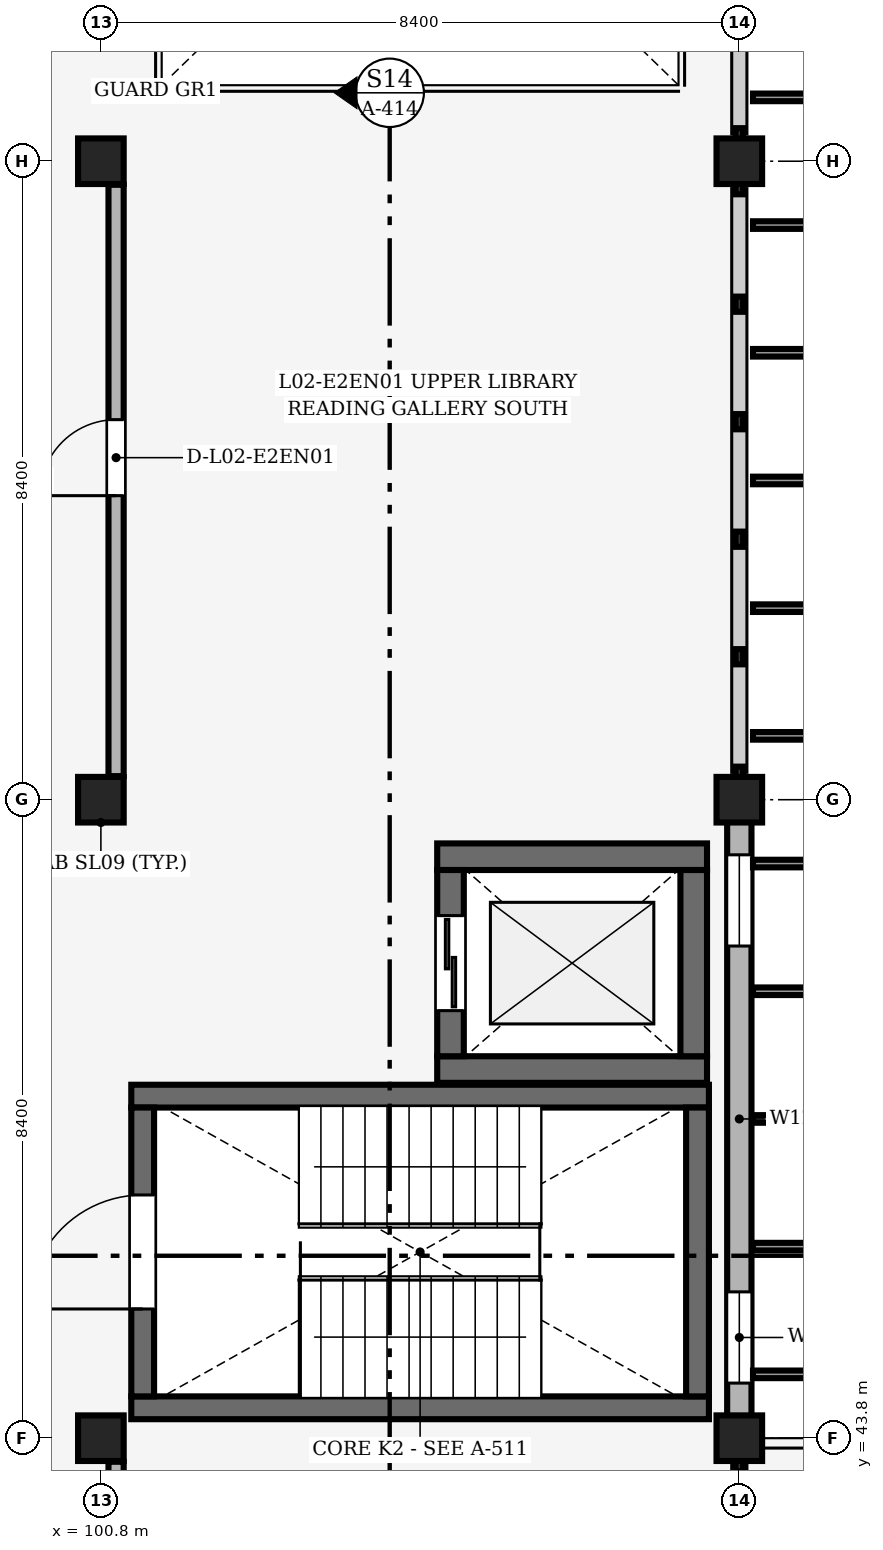
"""IFC4 building model, lengths in metres.
Left out: names, types, materials, properties, quantities, classifications, styles, units other than length and angle.
Written with IfcOpenShell. Run it as: python <this file> out.ifc"""

import sys

from ifc_helpers import new_model, si_unit, direction, frame, frame_2d, origin, origin_2d, place, context, subcontext, project, spatial, rectangle, extrude, element, fill, save


model = new_model("IFC4")
c1 = context("Model", 3, precision=1e-05, world=origin(), true_north=direction((0.0, 1.0)))
c2 = subcontext(c1, "Body", "Model", "MODEL_VIEW")
j1 = project(units=[si_unit("LENGTHUNIT", "METRE"), si_unit("PLANEANGLEUNIT", "RADIAN")], contexts=[c1])
p1 = place(None, origin())
s1 = spatial("IfcSite", under=j1, at=p1, CompositionType="ELEMENT")
p2 = place(p1, origin())
s2 = spatial("IfcBuilding", under=s1, at=p2, CompositionType="ELEMENT")
p3 = place(p2, frame((0.0, 0.0, 9.0)))
s3 = spatial("IfcBuildingStorey", under=s2, at=p3, CompositionType="ELEMENT", Elevation=9.0)
for number, where, z_axis, x_axis in (
    (1, (100.8, 43.8, 0.0), (0.0, 0.0, 1.0), (1.0, 0.0, 0.0)),
    (2, (100.8, 52.2, 0.0), (0.0, 0.0, 1.0), (1.0, 0.0, 0.0)),
    (3, (100.8, 60.6, 0.0), (0.0, 0.0, 1.0), (1.0, 0.0, 0.0)),
    (4, (109.2, 43.8, 0.0), (0.0, 0.0, 1.0), (1.0, 0.0, 0.0)),
    (5, (109.2, 52.2, 0.0), (0.0, 0.0, 1.0), (1.0, 0.0, 0.0)),
    (6, (109.2, 60.6, 0.0), (0.0, 0.0, 1.0), (1.0, 0.0, 0.0)),
):
    element("IfcColumn", number, at=place(p3, frame(where, z_axis=z_axis, x_axis=x_axis)), inside=s3, PredefinedType="COLUMN", context=c2, shape_type="SweptSolid", body=[
        extrude(rectangle(XDim=0.6, YDim=0.6, at=origin_2d()), origin(), (0.0, 0.0, 1.0), 4.2),
    ])
p4 = place(p3, frame((109.2, 44.075, 0.0), z_axis=(0.0, 0.0, 1.0), x_axis=(0.0, 1.0, 0.0)))
e7 = element("IfcWall", 7, at=p4, inside=s3, PredefinedType="SOLIDWALL", context=c2, shape_type="SweptSolid", body=[
    extrude(rectangle(XDim=7.85, YDim=0.32, at=frame_2d((3.925, 0.0))), origin(), (0.0, 0.0, 1.0), 3.34),
])
p5 = place(p4, frame((0.45, 0.0, 0.85)))
e8 = element("IfcOpeningElement", 8, at=p5, cuts=e7, PredefinedType="OPENING", context=c2, shape_type="SweptSolid", body=[
    extrude(rectangle(XDim=1.2, YDim=1.8, at=frame_2d((0.6, 0.9))), frame((0.0, 0.17, 0.0), z_axis=(0.0, -1.0, 0.0), x_axis=(1.0, 0.0, 0.0)), (0.0, 0.0, 1.0), 0.34),
])
p6 = place(p4, frame((6.2, 0.0, 0.85)))
e9 = element("IfcOpeningElement", 9, at=p6, cuts=e7, PredefinedType="OPENING", context=c2, shape_type="SweptSolid", body=[
    extrude(rectangle(XDim=1.2, YDim=1.8, at=frame_2d((0.6, 0.9))), frame((0.0, 0.17, 0.0), z_axis=(0.0, -1.0, 0.0), x_axis=(1.0, 0.0, 0.0)), (0.0, 0.0, 1.0), 0.34),
])
for number, where, z_axis, x_axis in (
    (10, (101.2, 44.2, 0.0), (0.0, 0.0, 1.0), (1.0, 0.0, 0.0)),
    (11, (101.2, 48.3, 0.0), (0.0, 0.0, 1.0), (1.0, 0.0, 0.0)),
):
    element("IfcWall", number, at=place(p3, frame(where, z_axis=z_axis, x_axis=x_axis)), inside=s3, PredefinedType="SHEAR", context=c2, shape_type="SweptSolid", body=[
        extrude(rectangle(XDim=7.6, YDim=0.3, at=frame_2d((3.8, 0.0))), origin(), (0.0, 0.0, 1.0), 4.025),
    ])
p7 = place(p3, frame((101.35, 44.35, 0.0), z_axis=(0.0, 0.0, 1.0), x_axis=(0.0, 1.0, 0.0)))
e12 = element("IfcWall", 12, at=p7, inside=s3, PredefinedType="SHEAR", context=c2, shape_type="SweptSolid", body=[
    extrude(rectangle(XDim=3.8, YDim=0.3, at=frame_2d((1.9, 0.0))), origin(), (0.0, 0.0, 1.0), 4.025),
])
p8 = place(p7, frame((1.15, 0.0, 0.0)))
e13 = element("IfcOpeningElement", 13, at=p8, cuts=e12, PredefinedType="OPENING", context=c2, shape_type="SweptSolid", body=[
    extrude(rectangle(XDim=1.5, YDim=2.2, at=frame_2d((0.75, 1.1))), frame((0.0, 0.16, 0.0), z_axis=(0.0, -1.0, 0.0), x_axis=(1.0, 0.0, 0.0)), (0.0, 0.0, 1.0), 0.32),
])
p9 = place(p3, frame((108.65, 44.35, 0.0), z_axis=(0.0, 0.0, 1.0), x_axis=(0.0, 1.0, 0.0)))
e14 = element("IfcWall", 14, at=p9, inside=s3, PredefinedType="SHEAR", context=c2, shape_type="SweptSolid", body=[
    extrude(rectangle(XDim=3.8, YDim=0.3, at=frame_2d((1.9, 0.0))), origin(), (0.0, 0.0, 1.0), 4.025),
])
for number, where, z_axis, x_axis in (
    (15, (105.225, 48.65, 0.0), (0.0, 0.0, 1.0), (1.0, 0.0, 0.0)),
    (16, (105.225, 51.45, 0.0), (0.0, 0.0, 1.0), (1.0, 0.0, 0.0)),
):
    element("IfcWall", number, at=place(p3, frame(where, z_axis=z_axis, x_axis=x_axis)), inside=s3, PredefinedType="SHEAR", context=c2, shape_type="SweptSolid", body=[
        extrude(rectangle(XDim=3.55, YDim=0.35, at=frame_2d((1.775, 0.0))), origin(), (0.0, 0.0, 1.0), 3.92),
    ])
p10 = place(p3, frame((105.4, 48.825, 0.0), z_axis=(0.0, 0.0, 1.0), x_axis=(0.0, 1.0, 0.0)))
e17 = element("IfcWall", 17, at=p10, inside=s3, PredefinedType="SHEAR", context=c2, shape_type="SweptSolid", body=[
    extrude(rectangle(XDim=2.45, YDim=0.35, at=frame_2d((1.225, 0.0))), origin(), (0.0, 0.0, 1.0), 3.92),
])
p11 = place(p10, frame((0.6, 0.0, 0.0)))
e18 = element("IfcOpeningElement", 18, at=p11, cuts=e17, PredefinedType="OPENING", context=c2, shape_type="SweptSolid", body=[
    extrude(rectangle(XDim=1.25, YDim=2.25, at=frame_2d((0.625, 1.125))), frame((0.0, 0.185, 0.0), z_axis=(0.0, -1.0, 0.0), x_axis=(1.0, 0.0, 0.0)), (0.0, 0.0, 1.0), 0.37),
])
p12 = place(p3, frame((108.6, 48.825, 0.0), z_axis=(0.0, 0.0, 1.0), x_axis=(0.0, 1.0, 0.0)))
e19 = element("IfcWall", 19, at=p12, inside=s3, PredefinedType="SHEAR", context=c2, shape_type="SweptSolid", body=[
    extrude(rectangle(XDim=2.45, YDim=0.35, at=frame_2d((1.225, 0.0))), origin(), (0.0, 0.0, 1.0), 3.92),
])
p13 = place(p3, frame((101.0, 35.71, 0.0), z_axis=(0.0, 0.0, 1.0), x_axis=(0.0, 1.0, 0.0)))
e20 = element("IfcWall", 20, at=p13, inside=s3, PredefinedType="PARTITIONING", context=c2, shape_type="SweptSolid", body=[
    extrude(rectangle(XDim=7.78, YDim=0.2, at=frame_2d((3.89, 0.0))), origin(), (0.0, 0.0, 1.0), 3.14),
])
p14 = place(p13, frame((1.165, 0.0, 0.0)))
e21 = element("IfcOpeningElement", 21, at=p14, cuts=e20, PredefinedType="OPENING", context=c2, shape_type="SweptSolid", body=[
    extrude(rectangle(XDim=1.05, YDim=2.2, at=frame_2d((0.525, 1.1))), frame((0.0, 0.11, 0.0), z_axis=(0.0, -1.0, 0.0), x_axis=(1.0, 0.0, 0.0)), (0.0, 0.0, 1.0), 0.22),
])
p15 = place(p3, frame((101.0, 52.51, 0.0), z_axis=(0.0, 0.0, 1.0), x_axis=(0.0, 1.0, 0.0)))
e22 = element("IfcWall", 22, at=p15, inside=s3, PredefinedType="PARTITIONING", context=c2, shape_type="SweptSolid", body=[
    extrude(rectangle(XDim=7.78, YDim=0.2, at=frame_2d((3.89, 0.0))), origin(), (0.0, 0.0, 1.0), 3.14),
])
p16 = place(p15, frame((3.69, 0.0, 0.0)))
e23 = element("IfcOpeningElement", 23, at=p16, cuts=e22, PredefinedType="OPENING", context=c2, shape_type="SweptSolid", body=[
    extrude(rectangle(XDim=1.0, YDim=2.15, at=frame_2d((0.5, 1.075))), frame((0.0, 0.11, 0.0), z_axis=(0.0, -1.0, 0.0), x_axis=(1.0, 0.0, 0.0)), (0.0, 0.0, 1.0), 0.22),
])
p17 = place(p5, origin())
e24 = element("IfcWindow", 24, at=p17, inside=s3, PartitioningType="SINGLE_PANEL", PredefinedType="WINDOW", context=c2, shape_type="SweptSolid", body=[
    extrude(rectangle(XDim=1.2, YDim=1.8, at=frame_2d((0.6, 0.9))), frame((0.0, 0.03, 0.0), z_axis=(0.0, -1.0, 0.0), x_axis=(1.0, 0.0, 0.0)), (0.0, 0.0, 1.0), 0.06),
])
fill(e8, e24)
p18 = place(p6, origin())
e25 = element("IfcWindow", 25, at=p18, inside=s3, PartitioningType="SINGLE_PANEL", PredefinedType="WINDOW", context=c2, shape_type="SweptSolid", body=[
    extrude(rectangle(XDim=1.2, YDim=1.8, at=frame_2d((0.6, 0.9))), frame((0.0, 0.03, 0.0), z_axis=(0.0, -1.0, 0.0), x_axis=(1.0, 0.0, 0.0)), (0.0, 0.0, 1.0), 0.06),
])
fill(e9, e25)
p19 = place(p8, origin())
e26 = element("IfcDoor", 26, at=p19, inside=s3, OperationType="DOUBLE_DOOR_SINGLE_SWING", PredefinedType="DOOR", context=c2, shape_type="SweptSolid", body=[
    extrude(rectangle(XDim=1.5, YDim=2.2, at=frame_2d((0.75, 1.1))), frame((0.0, 0.025, 0.0), z_axis=(0.0, -1.0, 0.0), x_axis=(1.0, 0.0, 0.0)), (0.0, 0.0, 1.0), 0.05),
])
fill(e13, e26)
p20 = place(p11, origin())
e27 = element("IfcDoor", 27, at=p20, inside=s3, OperationType="DOUBLE_DOOR_SLIDING", PredefinedType="DOOR", context=c2, shape_type="SweptSolid", body=[
    extrude(rectangle(XDim=1.25, YDim=2.25, at=frame_2d((0.625, 1.125))), frame((0.0, 0.025, 0.0), z_axis=(0.0, -1.0, 0.0), x_axis=(1.0, 0.0, 0.0)), (0.0, 0.0, 1.0), 0.05),
])
fill(e18, e27)
p21 = place(p16, origin())
e28 = element("IfcDoor", 28, at=p21, inside=s3, OperationType="SINGLE_SWING_LEFT", PredefinedType="DOOR", context=c2, shape_type="SweptSolid", body=[
    extrude(rectangle(XDim=1.0, YDim=2.15, at=frame_2d((0.5, 1.075))), frame((0.0, 0.025, 0.0), z_axis=(0.0, -1.0, 0.0), x_axis=(1.0, 0.0, 0.0)), (0.0, 0.0, 1.0), 0.05),
])
fill(e23, e28)
save(model, sys.argv[1])
